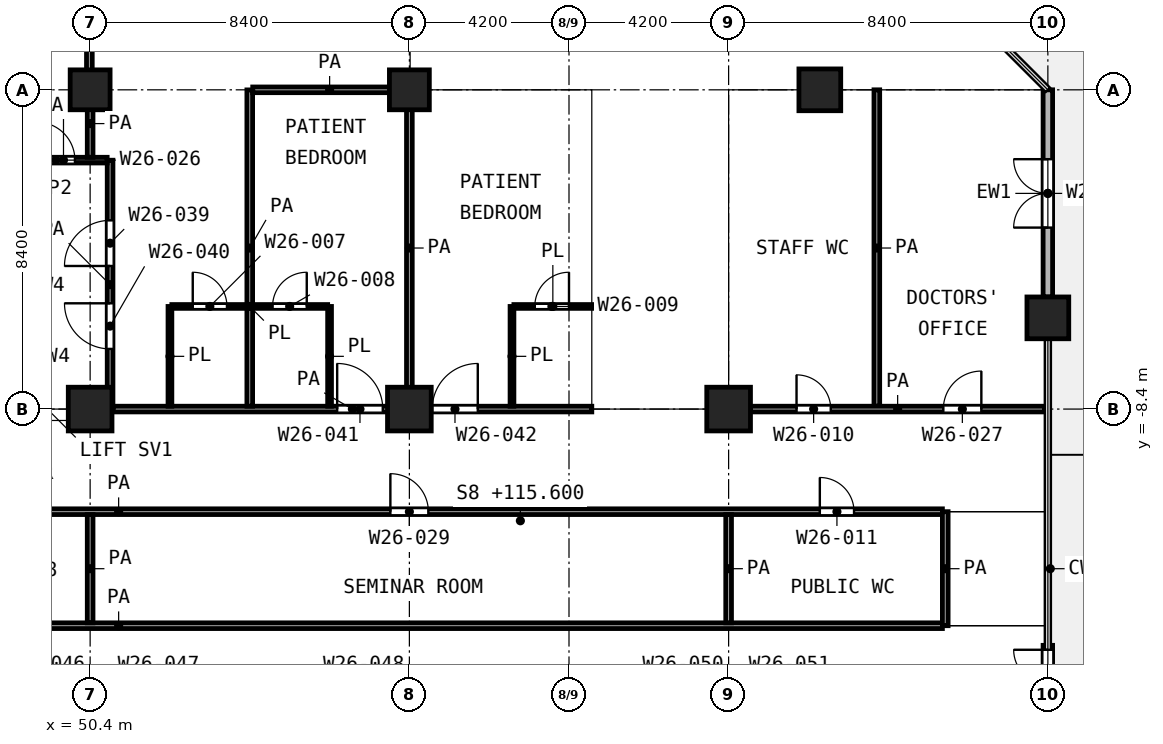
"""IFC4 building model, lengths in metres.
Left out: names, types, materials, properties, quantities, classifications, styles, units other than length and angle.
Written with IfcOpenShell. Run it as: python <this file> out.ifc"""

import sys

from ifc_helpers import new_model, si_unit, direction, frame, frame_2d, origin, origin_2d, place, context, subcontext, project, spatial, rectangle, extrude, element, fill, save


model = new_model("IFC4")
c1 = context("Model", 3, precision=1e-05, world=origin(), true_north=direction((0.0, 1.0)))
c2 = subcontext(c1, "Body", "Model", "MODEL_VIEW")
j1 = project(units=[si_unit("LENGTHUNIT", "METRE"), si_unit("PLANEANGLEUNIT", "RADIAN")], contexts=[c1])
p1 = place(None, origin())
s1 = spatial("IfcSite", under=j1, at=p1, CompositionType="ELEMENT")
p2 = place(p1, origin())
s2 = spatial("IfcBuilding", under=s1, at=p2, CompositionType="ELEMENT")
p3 = place(p2, frame((0.0, 0.0, 115.6)))
s3 = spatial("IfcBuildingStorey", under=s2, at=p3, CompositionType="ELEMENT", Elevation=115.6)
for number, where, z_axis, x_axis in (
    (1, (50.4, 0.0, 0.0), (0.0, 0.0, 1.0), (1.0, 0.0, 0.0)),
    (2, (58.8, 0.0, 0.0), (0.0, 0.0, 1.0), (1.0, 0.0, 0.0)),
):
    element("IfcColumn", number, at=place(p3, frame(where, z_axis=z_axis, x_axis=x_axis)), inside=s3, PredefinedType="COLUMN", context=c2, shape_type="SweptSolid", body=[
        extrude(rectangle(XDim=1.05, YDim=1.05, at=origin_2d()), origin(), (0.0, 0.0, 1.0), 4.2),
    ])
for number, where, z_axis, x_axis in (
    (3, (69.6, 0.0, 0.0), (0.0, 0.0, 1.0), (1.0, 0.0, 0.0)),
    (4, (75.6, -6.0, 0.0), (0.0, 0.0, 1.0), (1.0, 0.0, 0.0)),
):
    element("IfcColumn", number, at=place(p3, frame(where, z_axis=z_axis, x_axis=x_axis)), inside=s3, PredefinedType="COLUMN", context=c2, shape_type="SweptSolid", body=[
        extrude(rectangle(XDim=1.1, YDim=1.1, at=origin_2d()), origin(), (0.0, 0.0, 1.0), 4.2),
    ])
for number, where, z_axis, x_axis in (
    (5, (50.4, -8.4, 0.0), (0.0, 0.0, 1.0), (1.0, 0.0, 0.0)),
    (6, (58.8, -8.4, 0.0), (0.0, 0.0, 1.0), (1.0, 0.0, 0.0)),
    (7, (67.2, -8.4, 0.0), (0.0, 0.0, 1.0), (1.0, 0.0, 0.0)),
):
    element("IfcColumn", number, at=place(p3, frame(where, z_axis=z_axis, x_axis=x_axis)), inside=s3, PredefinedType="COLUMN", context=c2, shape_type="SweptSolid", body=[
        extrude(rectangle(XDim=1.15, YDim=1.15, at=origin_2d()), origin(), (0.0, 0.0, 1.0), 4.2),
    ])
p4 = place(p3, frame((75.6, -18.65, 0.0), z_axis=(0.0, 0.0, 1.0), x_axis=(0.0, 1.0, 0.0)))
e8 = element("IfcWall", 8, at=p4, inside=s3, PredefinedType="SOLIDWALL", context=c2, shape_type="SweptSolid", body=[
    extrude(rectangle(XDim=4.033, YDim=0.25, at=frame_2d((2.017, 0.0))), origin(), (0.0, 0.0, 1.0), 3.48),
])
p5 = place(p4, frame((2.117, 0.0, 0.0)))
e9 = element("IfcOpeningElement", 9, at=p5, cuts=e8, PredefinedType="OPENING", context=c2, shape_type="SweptSolid", body=[
    extrude(rectangle(XDim=1.8, YDim=2.1, at=frame_2d((0.9, 1.05))), frame((0.0, 0.135, 0.0), z_axis=(0.0, -1.0, 0.0), x_axis=(1.0, 0.0, 0.0)), (0.0, 0.0, 1.0), 0.27),
])
p6 = place(p3, frame((75.6, -5.45, 0.0), z_axis=(0.0, 0.0, 1.0), x_axis=(0.0, 1.0, 0.0)))
e10 = element("IfcWall", 10, at=p6, inside=s3, PredefinedType="SOLIDWALL", context=c2, shape_type="SweptSolid", body=[
    extrude(rectangle(XDim=5.45, YDim=0.25, at=frame_2d((2.725, 0.0))), origin(), (0.0, 0.0, 1.0), 3.48),
])
p7 = place(p6, frame((1.825, 0.0, 0.0)))
e11 = element("IfcOpeningElement", 11, at=p7, cuts=e10, PredefinedType="OPENING", context=c2, shape_type="SweptSolid", body=[
    extrude(rectangle(XDim=1.8, YDim=2.1, at=frame_2d((0.9, 1.05))), frame((0.0, 0.135, 0.0), z_axis=(0.0, -1.0, 0.0), x_axis=(1.0, 0.0, 0.0)), (0.0, 0.0, 1.0), 0.27),
])
p8 = place(p3, frame((52.55, -5.7, 0.0), z_axis=(0.0, 0.0, 1.0), x_axis=(1.0, 0.0, 0.0)))
e12 = element("IfcWall", 12, at=p8, inside=s3, PredefinedType="PARTITIONING", context=c2, shape_type="SweptSolid", body=[
    extrude(rectangle(XDim=4.1, YDim=0.1, at=frame_2d((2.05, 0.0))), origin(), (0.0, 0.0, 1.0), 3.6),
])
p9 = place(p8, frame((0.55, 0.0, 0.0)))
e13 = element("IfcOpeningElement", 13, at=p9, cuts=e12, PredefinedType="OPENING", context=c2, shape_type="SweptSolid", body=[
    extrude(rectangle(XDim=0.9, YDim=2.1, at=frame_2d((0.45, 1.05))), frame((0.0, 0.06, 0.0), z_axis=(0.0, -1.0, 0.0), x_axis=(1.0, 0.0, 0.0)), (0.0, 0.0, 1.0), 0.12),
])
p10 = place(p8, frame((2.65, 0.0, 0.0)))
e14 = element("IfcOpeningElement", 14, at=p10, cuts=e12, PredefinedType="OPENING", context=c2, shape_type="SweptSolid", body=[
    extrude(rectangle(XDim=0.9, YDim=2.1, at=frame_2d((0.45, 1.05))), frame((0.0, 0.06, 0.0), z_axis=(0.0, -1.0, 0.0), x_axis=(1.0, 0.0, 0.0)), (0.0, 0.0, 1.0), 0.12),
])
p11 = place(p3, frame((61.55, -5.7, 0.0), z_axis=(0.0, 0.0, 1.0), x_axis=(1.0, 0.0, 0.0)))
e15 = element("IfcWall", 15, at=p11, inside=s3, PredefinedType="PARTITIONING", context=c2, shape_type="SweptSolid", body=[
    extrude(rectangle(XDim=2.05, YDim=0.1, at=frame_2d((1.025, 0.0))), origin(), (0.0, 0.0, 1.0), 3.6),
])
p12 = place(p11, frame((0.55, 0.0, 0.0)))
e16 = element("IfcOpeningElement", 16, at=p12, cuts=e15, PredefinedType="OPENING", context=c2, shape_type="SweptSolid", body=[
    extrude(rectangle(XDim=0.9, YDim=2.1, at=frame_2d((0.45, 1.05))), frame((0.0, 0.06, 0.0), z_axis=(0.0, -1.0, 0.0), x_axis=(1.0, 0.0, 0.0)), (0.0, 0.0, 1.0), 0.12),
])
for number, where, z_axis, x_axis in (
    (17, (52.5, -8.325, 0.0), (0.0, 0.0, 1.0), (0.0, 1.0, 0.0)),
    (18, (56.7, -8.325, 0.0), (0.0, 0.0, 1.0), (0.0, 1.0, 0.0)),
    (19, (61.5, -8.325, 0.0), (0.0, 0.0, 1.0), (0.0, 1.0, 0.0)),
):
    element("IfcWall", number, at=place(p3, frame(where, z_axis=z_axis, x_axis=x_axis)), inside=s3, PredefinedType="PARTITIONING", context=c2, shape_type="SweptSolid", body=[
        extrude(rectangle(XDim=2.625, YDim=0.1, at=frame_2d((1.312, 0.0))), origin(), (0.0, 0.0, 1.0), 3.6),
    ])
p13 = place(p3, frame((29.475, -14.1, 0.0), z_axis=(0.0, 0.0, 1.0), x_axis=(1.0, 0.0, 0.0)))
e20 = element("IfcWall", 20, at=p13, inside=s3, PredefinedType="PARTITIONING", context=c2, shape_type="SweptSolid", body=[
    extrude(rectangle(XDim=43.35, YDim=0.15, at=frame_2d((21.675, 0.0))), origin(), (0.0, 0.0, 1.0), 3.6),
])
p14 = place(p13, frame((18.475, 0.0, 0.0)))
e21 = element("IfcOpeningElement", 21, at=p14, cuts=e20, PredefinedType="OPENING", context=c2, shape_type="SweptSolid", body=[
    extrude(rectangle(XDim=1.0, YDim=2.1, at=frame_2d((0.5, 1.05))), frame((0.0, 0.085, 0.0), z_axis=(0.0, -1.0, 0.0), x_axis=(1.0, 0.0, 0.0)), (0.0, 0.0, 1.0), 0.17),
])
p15 = place(p3, frame((29.475, -11.1, 0.0), z_axis=(0.0, 0.0, 1.0), x_axis=(1.0, 0.0, 0.0)))
e22 = element("IfcWall", 22, at=p15, inside=s3, PredefinedType="PARTITIONING", context=c2, shape_type="SweptSolid", body=[
    extrude(rectangle(XDim=43.35, YDim=0.15, at=frame_2d((21.675, 0.0))), origin(), (0.0, 0.0, 1.0), 3.6),
])
p16 = place(p15, frame((28.825, 0.0, 0.0)))
e23 = element("IfcOpeningElement", 23, at=p16, cuts=e22, PredefinedType="OPENING", context=c2, shape_type="SweptSolid", body=[
    extrude(rectangle(XDim=1.0, YDim=2.1, at=frame_2d((0.5, 1.05))), frame((0.0, 0.085, 0.0), z_axis=(0.0, -1.0, 0.0), x_axis=(1.0, 0.0, 0.0)), (0.0, 0.0, 1.0), 0.17),
])
p17 = place(p15, frame((40.125, 0.0, 0.0)))
e24 = element("IfcOpeningElement", 24, at=p17, cuts=e22, PredefinedType="OPENING", context=c2, shape_type="SweptSolid", body=[
    extrude(rectangle(XDim=0.9, YDim=2.1, at=frame_2d((0.45, 1.05))), frame((0.0, 0.085, 0.0), z_axis=(0.0, -1.0, 0.0), x_axis=(1.0, 0.0, 0.0)), (0.0, 0.0, 1.0), 0.17),
])
p18 = place(p15, frame((5.025, 0.0, 0.0)))
e25 = element("IfcOpeningElement", 25, at=p18, cuts=e22, PredefinedType="OPENING", context=c2, shape_type="SweptSolid", body=[
    extrude(rectangle(XDim=1.0, YDim=2.1, at=frame_2d((0.5, 1.05))), frame((0.0, 0.085, 0.0), z_axis=(0.0, -1.0, 0.0), x_axis=(1.0, 0.0, 0.0)), (0.0, 0.0, 1.0), 0.17),
])
p19 = place(p15, frame((12.525, 0.0, 0.0)))
e26 = element("IfcOpeningElement", 26, at=p19, cuts=e22, PredefinedType="OPENING", context=c2, shape_type="SweptSolid", body=[
    extrude(rectangle(XDim=1.0, YDim=2.1, at=frame_2d((0.5, 1.05))), frame((0.0, 0.085, 0.0), z_axis=(0.0, -1.0, 0.0), x_axis=(1.0, 0.0, 0.0)), (0.0, 0.0, 1.0), 0.17),
])
p20 = place(p3, frame((51.0, -8.4, 0.0), z_axis=(0.0, 0.0, 1.0), x_axis=(1.0, 0.0, 0.0)))
e27 = element("IfcWall", 27, at=p20, inside=s3, PredefinedType="PARTITIONING", context=c2, shape_type="SweptSolid", body=[
    extrude(rectangle(XDim=12.6, YDim=0.15, at=frame_2d((6.3, 0.0))), origin(), (0.0, 0.0, 1.0), 3.6),
])
p21 = place(p20, frame((5.9, 0.0, 0.0)))
e28 = element("IfcOpeningElement", 28, at=p21, cuts=e27, PredefinedType="OPENING", context=c2, shape_type="SweptSolid", body=[
    extrude(rectangle(XDim=1.2, YDim=2.1, at=frame_2d((0.6, 1.05))), frame((0.0, 0.085, 0.0), z_axis=(0.0, -1.0, 0.0), x_axis=(1.0, 0.0, 0.0)), (0.0, 0.0, 1.0), 0.17),
])
p22 = place(p20, frame((8.4, 0.0, 0.0)))
e29 = element("IfcOpeningElement", 29, at=p22, cuts=e27, PredefinedType="OPENING", context=c2, shape_type="SweptSolid", body=[
    extrude(rectangle(XDim=1.2, YDim=2.1, at=frame_2d((0.6, 1.05))), frame((0.0, 0.085, 0.0), z_axis=(0.0, -1.0, 0.0), x_axis=(1.0, 0.0, 0.0)), (0.0, 0.0, 1.0), 0.17),
])
p23 = place(p3, frame((67.775, -8.4, 0.0), z_axis=(0.0, 0.0, 1.0), x_axis=(1.0, 0.0, 0.0)))
e30 = element("IfcWall", 30, at=p23, inside=s3, PredefinedType="PARTITIONING", context=c2, shape_type="SweptSolid", body=[
    extrude(rectangle(XDim=7.745, YDim=0.15, at=frame_2d((3.873, 0.0))), origin(), (0.0, 0.0, 1.0), 3.6),
])
p24 = place(p23, frame((1.212, 0.0, 0.0)))
e31 = element("IfcOpeningElement", 31, at=p24, cuts=e30, PredefinedType="OPENING", context=c2, shape_type="SweptSolid", body=[
    extrude(rectangle(XDim=0.9, YDim=2.1, at=frame_2d((0.45, 1.05))), frame((0.0, 0.085, 0.0), z_axis=(0.0, -1.0, 0.0), x_axis=(1.0, 0.0, 0.0)), (0.0, 0.0, 1.0), 0.17),
])
p25 = place(p23, frame((5.075, 0.0, 0.0)))
e32 = element("IfcOpeningElement", 32, at=p25, cuts=e30, PredefinedType="OPENING", context=c2, shape_type="SweptSolid", body=[
    extrude(rectangle(XDim=1.0, YDim=2.1, at=frame_2d((0.5, 1.05))), frame((0.0, 0.085, 0.0), z_axis=(0.0, -1.0, 0.0), x_axis=(1.0, 0.0, 0.0)), (0.0, 0.0, 1.0), 0.17),
])
p26 = place(p3, frame((48.55, -1.85, 0.0), z_axis=(0.0, 0.0, 1.0), x_axis=(1.0, 0.0, 0.0)))
e33 = element("IfcWall", 33, at=p26, inside=s3, PredefinedType="PARTITIONING", context=c2, shape_type="SweptSolid", body=[
    extrude(rectangle(XDim=2.298, YDim=0.15, at=frame_2d((1.149, 0.0))), origin(), (0.0, 0.0, 1.0), 3.6),
])
p27 = place(p26, frame((0.45, 0.0, 0.0)))
e34 = element("IfcOpeningElement", 34, at=p27, cuts=e33, PredefinedType="OPENING", context=c2, shape_type="SweptSolid", body=[
    extrude(rectangle(XDim=1.0, YDim=2.1, at=frame_2d((0.5, 1.05))), frame((0.0, 0.085, 0.0), z_axis=(0.0, -1.0, 0.0), x_axis=(1.0, 0.0, 0.0)), (0.0, 0.0, 1.0), 0.17),
])
p28 = place(p3, frame((54.678, 0.0, 0.0), z_axis=(0.0, 0.0, 1.0), x_axis=(1.0, 0.0, 0.0)))
e35 = element("IfcWall", 35, at=p28, inside=s3, PredefinedType="PARTITIONING", context=c2, shape_type="SweptSolid", body=[
    extrude(rectangle(XDim=4.047, YDim=0.15, at=frame_2d((2.023, 0.0))), origin(), (0.0, 0.0, 1.0), 3.6),
])
p29 = place(p3, frame((50.38, 0.02, 0.0), z_axis=(0.0, 0.0, 1.0), x_axis=(0.0, 1.0, 0.0)))
e36 = element("IfcWall", 36, at=p29, inside=s3, PredefinedType="PARTITIONING", context=c2, shape_type="SweptSolid", body=[
    extrude(rectangle(XDim=5.9, YDim=0.15, at=frame_2d((2.95, 0.0))), origin(), (0.0, 0.0, 1.0), 3.6),
])
p30 = place(p3, frame((50.4, -14.025, 0.0), z_axis=(0.0, 0.0, 1.0), x_axis=(0.0, 1.0, 0.0)))
e37 = element("IfcWall", 37, at=p30, inside=s3, PredefinedType="PARTITIONING", context=c2, shape_type="SweptSolid", body=[
    extrude(rectangle(XDim=2.85, YDim=0.15, at=frame_2d((1.425, 0.0))), origin(), (0.0, 0.0, 1.0), 3.6),
])
p31 = place(p3, frame((50.4, -1.775, 0.0), z_axis=(0.0, 0.0, 1.0), x_axis=(0.0, 1.0, 0.0)))
e38 = element("IfcWall", 38, at=p31, inside=s3, PredefinedType="PARTITIONING", context=c2, shape_type="SweptSolid", body=[
    extrude(rectangle(XDim=1.773, YDim=0.15, at=frame_2d((0.886, 0.0))), origin(), (0.0, 0.0, 1.0), 3.6),
])
p32 = place(p3, frame((50.925, -8.4, 0.0), z_axis=(0.0, 0.0, 1.0), x_axis=(0.0, 1.0, 0.0)))
e39 = element("IfcWall", 39, at=p32, inside=s3, PredefinedType="PARTITIONING", context=c2, shape_type="SweptSolid", body=[
    extrude(rectangle(XDim=6.548, YDim=0.15, at=frame_2d((3.274, 0.0))), origin(), (0.0, 0.0, 1.0), 3.6),
])
p33 = place(p32, frame((3.765, 0.0, 0.0)))
e40 = element("IfcOpeningElement", 40, at=p33, cuts=e39, PredefinedType="OPENING", context=c2, shape_type="SweptSolid", body=[
    extrude(rectangle(XDim=1.2, YDim=2.1, at=frame_2d((0.6, 1.05))), frame((0.0, 0.085, 0.0), z_axis=(0.0, -1.0, 0.0), x_axis=(1.0, 0.0, 0.0)), (0.0, 0.0, 1.0), 0.17),
])
p34 = place(p32, frame((1.583, 0.0, 0.0)))
e41 = element("IfcOpeningElement", 41, at=p34, cuts=e39, PredefinedType="OPENING", context=c2, shape_type="SweptSolid", body=[
    extrude(rectangle(XDim=1.2, YDim=2.1, at=frame_2d((0.6, 1.05))), frame((0.0, 0.085, 0.0), z_axis=(0.0, -1.0, 0.0), x_axis=(1.0, 0.0, 0.0)), (0.0, 0.0, 1.0), 0.17),
])
p35 = place(p3, frame((54.6, -8.325, 0.0), z_axis=(0.0, 0.0, 1.0), x_axis=(0.0, 1.0, 0.0)))
e42 = element("IfcWall", 42, at=p35, inside=s3, PredefinedType="PARTITIONING", context=c2, shape_type="SweptSolid", body=[
    extrude(rectangle(XDim=8.323, YDim=0.15, at=frame_2d((4.162, 0.0))), origin(), (0.0, 0.0, 1.0), 3.6),
])
p36 = place(p3, frame((58.8, -8.325, 0.0), z_axis=(0.0, 0.0, 1.0), x_axis=(0.0, 1.0, 0.0)))
e43 = element("IfcWall", 43, at=p36, inside=s3, PredefinedType="PARTITIONING", context=c2, shape_type="SweptSolid", body=[
    extrude(rectangle(XDim=8.325, YDim=0.15, at=frame_2d((4.163, 0.0))), origin(), (0.0, 0.0, 1.0), 3.6),
])
p37 = place(p3, frame((67.2, -14.025, 0.0), z_axis=(0.0, 0.0, 1.0), x_axis=(0.0, 1.0, 0.0)))
e44 = element("IfcWall", 44, at=p37, inside=s3, PredefinedType="PARTITIONING", context=c2, shape_type="SweptSolid", body=[
    extrude(rectangle(XDim=2.85, YDim=0.15, at=frame_2d((1.425, 0.0))), origin(), (0.0, 0.0, 1.0), 3.6),
])
p38 = place(p3, frame((71.1, -8.325, 0.0), z_axis=(0.0, 0.0, 1.0), x_axis=(0.0, 1.0, 0.0)))
e45 = element("IfcWall", 45, at=p38, inside=s3, PredefinedType="PARTITIONING", context=c2, shape_type="SweptSolid", body=[
    extrude(rectangle(XDim=8.325, YDim=0.15, at=frame_2d((4.163, 0.0))), origin(), (0.0, 0.0, 1.0), 3.6),
])
p39 = place(p3, frame((72.9, -14.1, 0.0), z_axis=(0.0, 0.0, 1.0), x_axis=(0.0, 1.0, 0.0)))
e46 = element("IfcWall", 46, at=p39, inside=s3, PredefinedType="PARTITIONING", context=c2, shape_type="SweptSolid", body=[
    extrude(rectangle(XDim=3.0, YDim=0.15, at=frame_2d((1.5, 0.0))), origin(), (0.0, 0.0, 1.0), 3.6),
])
p40 = place(p5, origin())
e47 = element("IfcDoor", 47, at=p40, inside=s3, OperationType="DOUBLE_DOOR_SINGLE_SWING", PredefinedType="DOOR", context=c2, shape_type="SweptSolid", body=[
    extrude(rectangle(XDim=1.8, YDim=2.1, at=frame_2d((0.9, 1.05))), frame((0.0, 0.025, 0.0), z_axis=(0.0, -1.0, 0.0), x_axis=(1.0, 0.0, 0.0)), (0.0, 0.0, 1.0), 0.05),
])
fill(e9, e47)
p41 = place(p7, origin())
e48 = element("IfcDoor", 48, at=p41, inside=s3, OperationType="DOUBLE_DOOR_SINGLE_SWING", PredefinedType="DOOR", context=c2, shape_type="SweptSolid", body=[
    extrude(rectangle(XDim=1.8, YDim=2.1, at=frame_2d((0.9, 1.05))), frame((0.0, 0.025, 0.0), z_axis=(0.0, -1.0, 0.0), x_axis=(1.0, 0.0, 0.0)), (0.0, 0.0, 1.0), 0.05),
])
fill(e11, e48)
p42 = place(p27, origin())
e49 = element("IfcDoor", 49, at=p42, inside=s3, OperationType="SINGLE_SWING_LEFT", PredefinedType="DOOR", context=c2, shape_type="SweptSolid", body=[
    extrude(rectangle(XDim=1.0, YDim=2.1, at=frame_2d((0.5, 1.05))), frame((0.0, 0.025, 0.0), z_axis=(0.0, -1.0, 0.0), x_axis=(1.0, 0.0, 0.0)), (0.0, 0.0, 1.0), 0.05),
])
fill(e34, e49)
p43 = place(p33, origin())
e50 = element("IfcDoor", 50, at=p43, inside=s3, OperationType="SINGLE_SWING_LEFT", PredefinedType="DOOR", context=c2, shape_type="SweptSolid", body=[
    extrude(rectangle(XDim=1.2, YDim=2.1, at=frame_2d((0.6, 1.05))), frame((0.0, 0.025, 0.0), z_axis=(0.0, -1.0, 0.0), x_axis=(1.0, 0.0, 0.0)), (0.0, 0.0, 1.0), 0.05),
])
fill(e40, e50)
p44 = place(p34, origin())
e51 = element("IfcDoor", 51, at=p44, inside=s3, OperationType="SINGLE_SWING_RIGHT", PredefinedType="DOOR", context=c2, shape_type="SweptSolid", body=[
    extrude(rectangle(XDim=1.2, YDim=2.1, at=frame_2d((0.6, 1.05))), frame((0.0, 0.025, 0.0), z_axis=(0.0, -1.0, 0.0), x_axis=(1.0, 0.0, 0.0)), (0.0, 0.0, 1.0), 0.05),
])
fill(e41, e51)
p45 = place(p9, origin())
e52 = element("IfcDoor", 52, at=p45, inside=s3, OperationType="SINGLE_SWING_LEFT", PredefinedType="DOOR", context=c2, shape_type="SweptSolid", body=[
    extrude(rectangle(XDim=0.9, YDim=2.1, at=frame_2d((0.45, 1.05))), frame((0.0, 0.025, 0.0), z_axis=(0.0, -1.0, 0.0), x_axis=(1.0, 0.0, 0.0)), (0.0, 0.0, 1.0), 0.05),
])
fill(e13, e52)
p46 = place(p21, origin())
e53 = element("IfcDoor", 53, at=p46, inside=s3, OperationType="SINGLE_SWING_LEFT", PredefinedType="DOOR", context=c2, shape_type="SweptSolid", body=[
    extrude(rectangle(XDim=1.2, YDim=2.1, at=frame_2d((0.6, 1.05))), frame((0.0, 0.025, 0.0), z_axis=(0.0, -1.0, 0.0), x_axis=(1.0, 0.0, 0.0)), (0.0, 0.0, 1.0), 0.05),
])
fill(e28, e53)
p47 = place(p10, origin())
e54 = element("IfcDoor", 54, at=p47, inside=s3, OperationType="SINGLE_SWING_RIGHT", PredefinedType="DOOR", context=c2, shape_type="SweptSolid", body=[
    extrude(rectangle(XDim=0.9, YDim=2.1, at=frame_2d((0.45, 1.05))), frame((0.0, 0.025, 0.0), z_axis=(0.0, -1.0, 0.0), x_axis=(1.0, 0.0, 0.0)), (0.0, 0.0, 1.0), 0.05),
])
fill(e14, e54)
p48 = place(p22, origin())
e55 = element("IfcDoor", 55, at=p48, inside=s3, OperationType="SINGLE_SWING_RIGHT", PredefinedType="DOOR", context=c2, shape_type="SweptSolid", body=[
    extrude(rectangle(XDim=1.2, YDim=2.1, at=frame_2d((0.6, 1.05))), frame((0.0, 0.025, 0.0), z_axis=(0.0, -1.0, 0.0), x_axis=(1.0, 0.0, 0.0)), (0.0, 0.0, 1.0), 0.05),
])
fill(e29, e55)
p49 = place(p12, origin())
e56 = element("IfcDoor", 56, at=p49, inside=s3, OperationType="SINGLE_SWING_RIGHT", PredefinedType="DOOR", context=c2, shape_type="SweptSolid", body=[
    extrude(rectangle(XDim=0.9, YDim=2.1, at=frame_2d((0.45, 1.05))), frame((0.0, 0.025, 0.0), z_axis=(0.0, -1.0, 0.0), x_axis=(1.0, 0.0, 0.0)), (0.0, 0.0, 1.0), 0.05),
])
fill(e16, e56)
p50 = place(p24, origin())
e57 = element("IfcDoor", 57, at=p50, inside=s3, OperationType="SINGLE_SWING_LEFT", PredefinedType="DOOR", context=c2, shape_type="SweptSolid", body=[
    extrude(rectangle(XDim=0.9, YDim=2.1, at=frame_2d((0.45, 1.05))), frame((0.0, 0.025, 0.0), z_axis=(0.0, -1.0, 0.0), x_axis=(1.0, 0.0, 0.0)), (0.0, 0.0, 1.0), 0.05),
])
fill(e31, e57)
p51 = place(p25, origin())
e58 = element("IfcDoor", 58, at=p51, inside=s3, OperationType="SINGLE_SWING_RIGHT", PredefinedType="DOOR", context=c2, shape_type="SweptSolid", body=[
    extrude(rectangle(XDim=1.0, YDim=2.1, at=frame_2d((0.5, 1.05))), frame((0.0, 0.025, 0.0), z_axis=(0.0, -1.0, 0.0), x_axis=(1.0, 0.0, 0.0)), (0.0, 0.0, 1.0), 0.05),
])
fill(e32, e58)
p52 = place(p16, origin())
e59 = element("IfcDoor", 59, at=p52, inside=s3, OperationType="SINGLE_SWING_LEFT", PredefinedType="DOOR", context=c2, shape_type="SweptSolid", body=[
    extrude(rectangle(XDim=1.0, YDim=2.1, at=frame_2d((0.5, 1.05))), frame((0.0, 0.025, 0.0), z_axis=(0.0, -1.0, 0.0), x_axis=(1.0, 0.0, 0.0)), (0.0, 0.0, 1.0), 0.05),
])
fill(e23, e59)
p53 = place(p17, origin())
e60 = element("IfcDoor", 60, at=p53, inside=s3, OperationType="SINGLE_SWING_LEFT", PredefinedType="DOOR", context=c2, shape_type="SweptSolid", body=[
    extrude(rectangle(XDim=0.9, YDim=2.1, at=frame_2d((0.45, 1.05))), frame((0.0, 0.025, 0.0), z_axis=(0.0, -1.0, 0.0), x_axis=(1.0, 0.0, 0.0)), (0.0, 0.0, 1.0), 0.05),
])
fill(e24, e60)
save(model, sys.argv[1])
